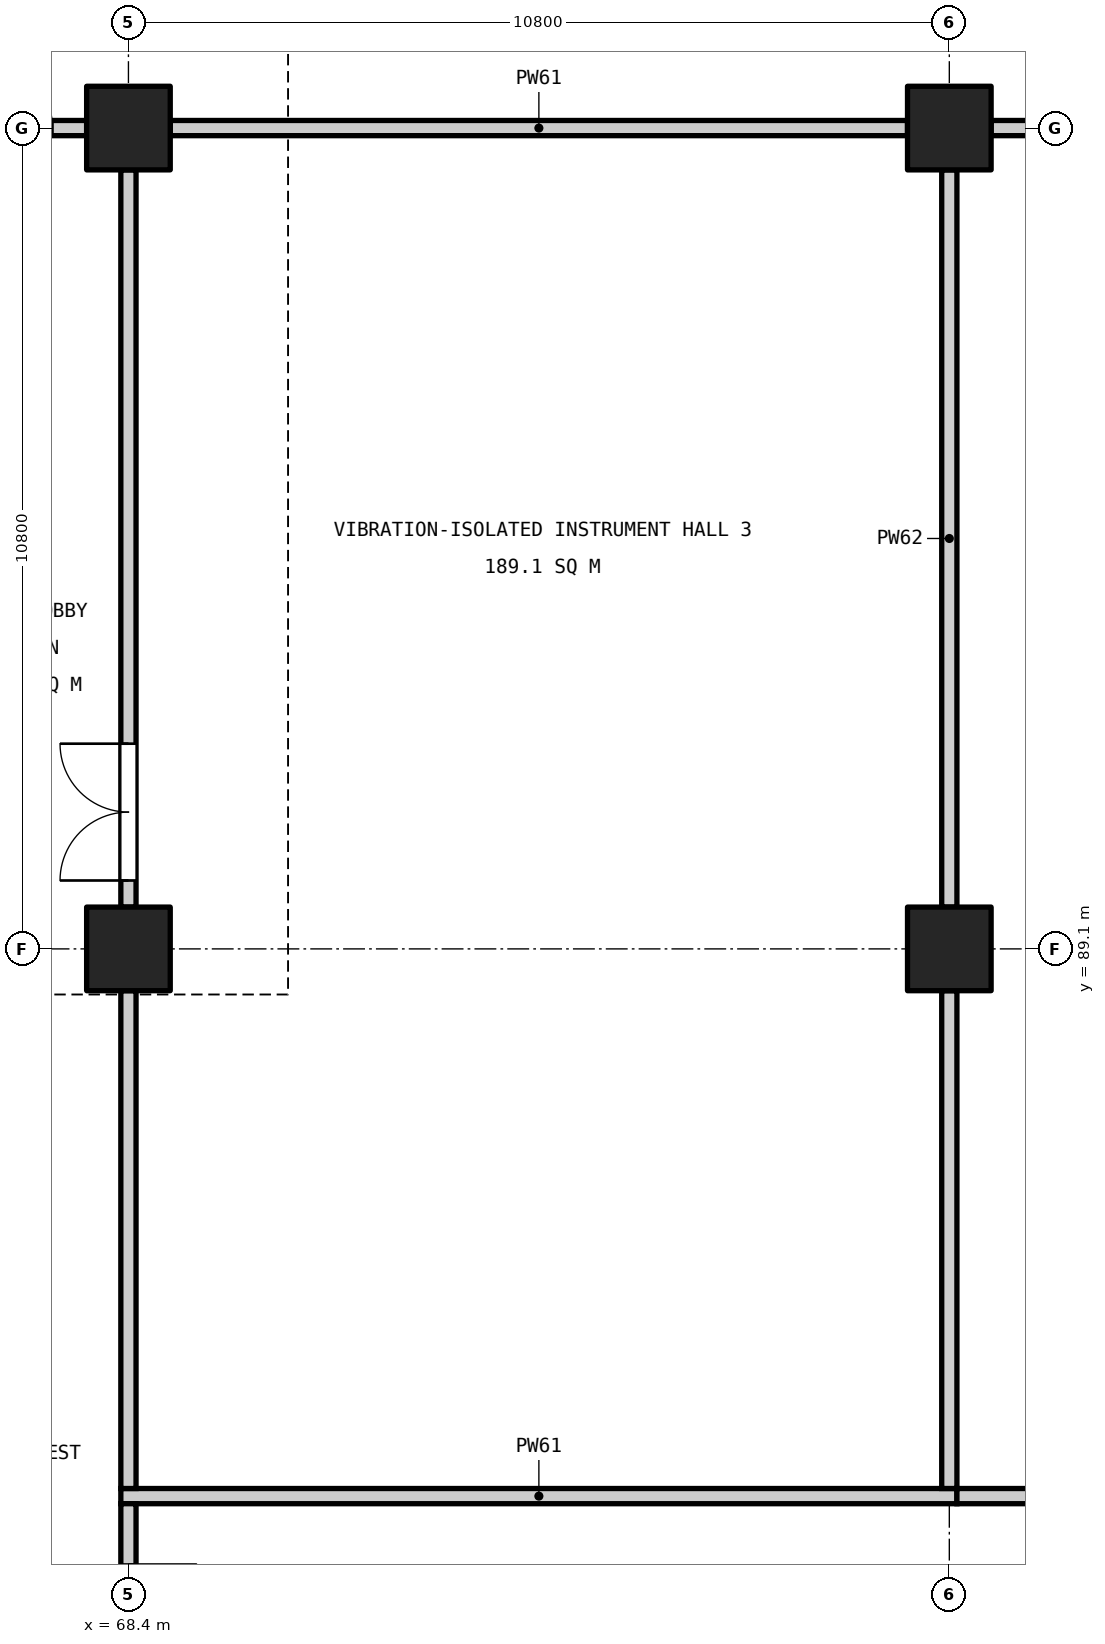
"""IFC4 building model, lengths in metres.
Left out: names, types, materials, properties, quantities, classifications, styles, units other than length and angle.
Written with IfcOpenShell. Run it as: python <this file> out.ifc"""

import sys

from ifc_helpers import new_model, si_unit, direction, frame, frame_2d, origin, origin_2d, place, context, subcontext, project, spatial, rectangle, extrude, element, fill, save


model = new_model("IFC4")
c1 = context("Model", 3, precision=1e-05, world=origin(), true_north=direction((0.0, 1.0)))
c2 = subcontext(c1, "Body", "Model", "MODEL_VIEW")
j1 = project(units=[si_unit("LENGTHUNIT", "METRE"), si_unit("PLANEANGLEUNIT", "RADIAN")], contexts=[c1])
p1 = place(None, origin())
s1 = spatial("IfcSite", under=j1, at=p1, CompositionType="ELEMENT")
p2 = place(p1, origin())
s2 = spatial("IfcBuilding", under=s1, at=p2, CompositionType="ELEMENT")
p3 = place(p2, frame((0.0, 0.0, -9.6)))
s3 = spatial("IfcBuildingStorey", under=s2, at=p3, CompositionType="ELEMENT", Elevation=-9.6)
for number, where, z_axis, x_axis in (
    (1, (68.4, 89.1, 0.0), (0.0, 0.0, 1.0), (1.0, 0.0, 0.0)),
    (2, (68.4, 99.9, 0.0), (0.0, 0.0, 1.0), (1.0, 0.0, 0.0)),
    (3, (79.2, 89.1, 0.0), (0.0, 0.0, 1.0), (1.0, 0.0, 0.0)),
    (4, (79.2, 99.9, 0.0), (0.0, 0.0, 1.0), (1.0, 0.0, 0.0)),
):
    element("IfcColumn", number, at=place(p3, frame(where, z_axis=z_axis, x_axis=x_axis)), inside=s3, PredefinedType="COLUMN", context=c2, shape_type="SweptSolid", body=[
        extrude(rectangle(XDim=1.1, YDim=1.1, at=origin_2d()), origin(), (0.0, 0.0, 1.0), 4.35),
    ])
p4 = place(p3, frame((68.3, 81.9, 0.0), z_axis=(0.0, 0.0, 1.0), x_axis=(1.0, 0.0, 0.0)))
e5 = element("IfcWall", 5, at=p4, inside=s3, PredefinedType="PARTITIONING", context=c2, shape_type="SweptSolid", body=[
    extrude(rectangle(XDim=11.0, YDim=0.2, at=frame_2d((5.5, 0.0))), origin(), (0.0, 0.0, 1.0), 4.35),
])
p5 = place(p3, frame((79.3, 81.9, 0.0), z_axis=(0.0, 0.0, 1.0), x_axis=(1.0, 0.0, 0.0)))
e6 = element("IfcWall", 6, at=p5, inside=s3, PredefinedType="PARTITIONING", context=c2, shape_type="SweptSolid", body=[
    extrude(rectangle(XDim=11.7, YDim=0.2, at=frame_2d((5.85, 0.0))), origin(), (0.0, 0.0, 1.0), 4.35),
])
p6 = place(p3, frame((65.95, 99.9, 0.0), z_axis=(0.0, 0.0, 1.0), x_axis=(1.0, 0.0, 0.0)))
e7 = element("IfcWall", 7, at=p6, inside=s3, PredefinedType="PARTITIONING", context=c2, shape_type="SweptSolid", body=[
    extrude(rectangle(XDim=1.9, YDim=0.2, at=frame_2d((0.95, 0.0))), origin(), (0.0, 0.0, 1.0), 4.35),
])
p7 = place(p6, frame((0.45, 0.0, 0.0)))
e8 = element("IfcOpeningElement", 8, at=p7, cuts=e7, PredefinedType="OPENING", context=c2, shape_type="SweptSolid", body=[
    extrude(rectangle(XDim=1.0, YDim=2.1, at=frame_2d((0.5, 1.05))), frame((0.0, 0.11, 0.0), z_axis=(0.0, -1.0, 0.0), x_axis=(1.0, 0.0, 0.0)), (0.0, 0.0, 1.0), 0.22),
])
p8 = place(p3, frame((68.95, 99.9, 0.0), z_axis=(0.0, 0.0, 1.0), x_axis=(1.0, 0.0, 0.0)))
e9 = element("IfcWall", 9, at=p8, inside=s3, PredefinedType="PARTITIONING", context=c2, shape_type="SweptSolid", body=[
    extrude(rectangle(XDim=9.7, YDim=0.2, at=frame_2d((4.85, 0.0))), origin(), (0.0, 0.0, 1.0), 4.35),
])
p9 = place(p3, frame((79.75, 99.9, 0.0), z_axis=(0.0, 0.0, 1.0), x_axis=(1.0, 0.0, 0.0)))
e10 = element("IfcWall", 10, at=p9, inside=s3, PredefinedType="PARTITIONING", context=c2, shape_type="SweptSolid", body=[
    extrude(rectangle(XDim=9.725, YDim=0.2, at=frame_2d((4.863, 0.0))), origin(), (0.0, 0.0, 1.0), 4.35),
])
p10 = place(p9, frame((4.4, 0.0, 0.0)))
e11 = element("IfcOpeningElement", 11, at=p10, cuts=e10, PredefinedType="OPENING", context=c2, shape_type="SweptSolid", body=[
    extrude(rectangle(XDim=1.8, YDim=2.1, at=frame_2d((0.9, 1.05))), frame((0.0, 0.11, 0.0), z_axis=(0.0, -1.0, 0.0), x_axis=(1.0, 0.0, 0.0)), (0.0, 0.0, 1.0), 0.22),
])
p11 = place(p3, frame((68.4, 78.85, 0.0), z_axis=(0.0, 0.0, 1.0), x_axis=(0.0, 1.0, 0.0)))
e12 = element("IfcWall", 12, at=p11, inside=s3, PredefinedType="PARTITIONING", context=c2, shape_type="SweptSolid", body=[
    extrude(rectangle(XDim=2.95, YDim=0.2, at=frame_2d((1.475, 0.0))), origin(), (0.0, 0.0, 1.0), 4.35),
])
p12 = place(p11, frame((0.35, 0.0, 0.0)))
e13 = element("IfcOpeningElement", 13, at=p12, cuts=e12, PredefinedType="OPENING", context=c2, shape_type="SweptSolid", body=[
    extrude(rectangle(XDim=1.8, YDim=2.1, at=frame_2d((0.9, 1.05))), frame((0.0, 0.11, 0.0), z_axis=(0.0, -1.0, 0.0), x_axis=(1.0, 0.0, 0.0)), (0.0, 0.0, 1.0), 0.22),
])
p13 = place(p3, frame((68.4, 82.0, 0.0), z_axis=(0.0, 0.0, 1.0), x_axis=(0.0, 1.0, 0.0)))
e14 = element("IfcWall", 14, at=p13, inside=s3, PredefinedType="PARTITIONING", context=c2, shape_type="SweptSolid", body=[
    extrude(rectangle(XDim=6.55, YDim=0.2, at=frame_2d((3.275, 0.0))), origin(), (0.0, 0.0, 1.0), 4.35),
])
p14 = place(p3, frame((68.4, 89.65, 0.0), z_axis=(0.0, 0.0, 1.0), x_axis=(0.0, 1.0, 0.0)))
e15 = element("IfcWall", 15, at=p14, inside=s3, PredefinedType="PARTITIONING", context=c2, shape_type="SweptSolid", body=[
    extrude(rectangle(XDim=9.7, YDim=0.2, at=frame_2d((4.85, 0.0))), origin(), (0.0, 0.0, 1.0), 4.35),
])
p15 = place(p14, frame((0.35, 0.0, 0.0)))
e16 = element("IfcOpeningElement", 16, at=p15, cuts=e15, PredefinedType="OPENING", context=c2, shape_type="SweptSolid", body=[
    extrude(rectangle(XDim=1.8, YDim=2.1, at=frame_2d((0.9, 1.05))), frame((0.0, 0.11, 0.0), z_axis=(0.0, -1.0, 0.0), x_axis=(1.0, 0.0, 0.0)), (0.0, 0.0, 1.0), 0.22),
])
p16 = place(p3, frame((79.2, 82.0, 0.0), z_axis=(0.0, 0.0, 1.0), x_axis=(0.0, 1.0, 0.0)))
e17 = element("IfcWall", 17, at=p16, inside=s3, PredefinedType="PARTITIONING", context=c2, shape_type="SweptSolid", body=[
    extrude(rectangle(XDim=6.55, YDim=0.2, at=frame_2d((3.275, 0.0))), origin(), (0.0, 0.0, 1.0), 4.35),
])
p17 = place(p3, frame((79.2, 89.65, 0.0), z_axis=(0.0, 0.0, 1.0), x_axis=(0.0, 1.0, 0.0)))
e18 = element("IfcWall", 18, at=p17, inside=s3, PredefinedType="PARTITIONING", context=c2, shape_type="SweptSolid", body=[
    extrude(rectangle(XDim=9.7, YDim=0.2, at=frame_2d((4.85, 0.0))), origin(), (0.0, 0.0, 1.0), 4.35),
])
p18 = place(p15, origin())
e19 = element("IfcDoor", 19, at=p18, inside=s3, OperationType="DOUBLE_DOOR_SINGLE_SWING", PredefinedType="DOOR", context=c2, shape_type="SweptSolid", body=[
    extrude(rectangle(XDim=1.8, YDim=2.1, at=frame_2d((0.9, 1.05))), frame((0.0, 0.025, 0.0), z_axis=(0.0, -1.0, 0.0), x_axis=(1.0, 0.0, 0.0)), (0.0, 0.0, 1.0), 0.05),
])
fill(e16, e19)
p19 = place(p12, frame((1.8, 0.0, 0.0), z_axis=(0.0, 0.0, 1.0), x_axis=(-1.0, 0.0, 0.0)))
e20 = element("IfcDoor", 20, at=p19, inside=s3, OperationType="DOUBLE_DOOR_SINGLE_SWING", PredefinedType="DOOR", context=c2, shape_type="SweptSolid", body=[
    extrude(rectangle(XDim=1.8, YDim=2.1, at=frame_2d((0.9, 1.05))), frame((0.0, 0.025, 0.0), z_axis=(0.0, -1.0, 0.0), x_axis=(1.0, 0.0, 0.0)), (0.0, 0.0, 1.0), 0.05),
])
fill(e13, e20)
save(model, sys.argv[1])
